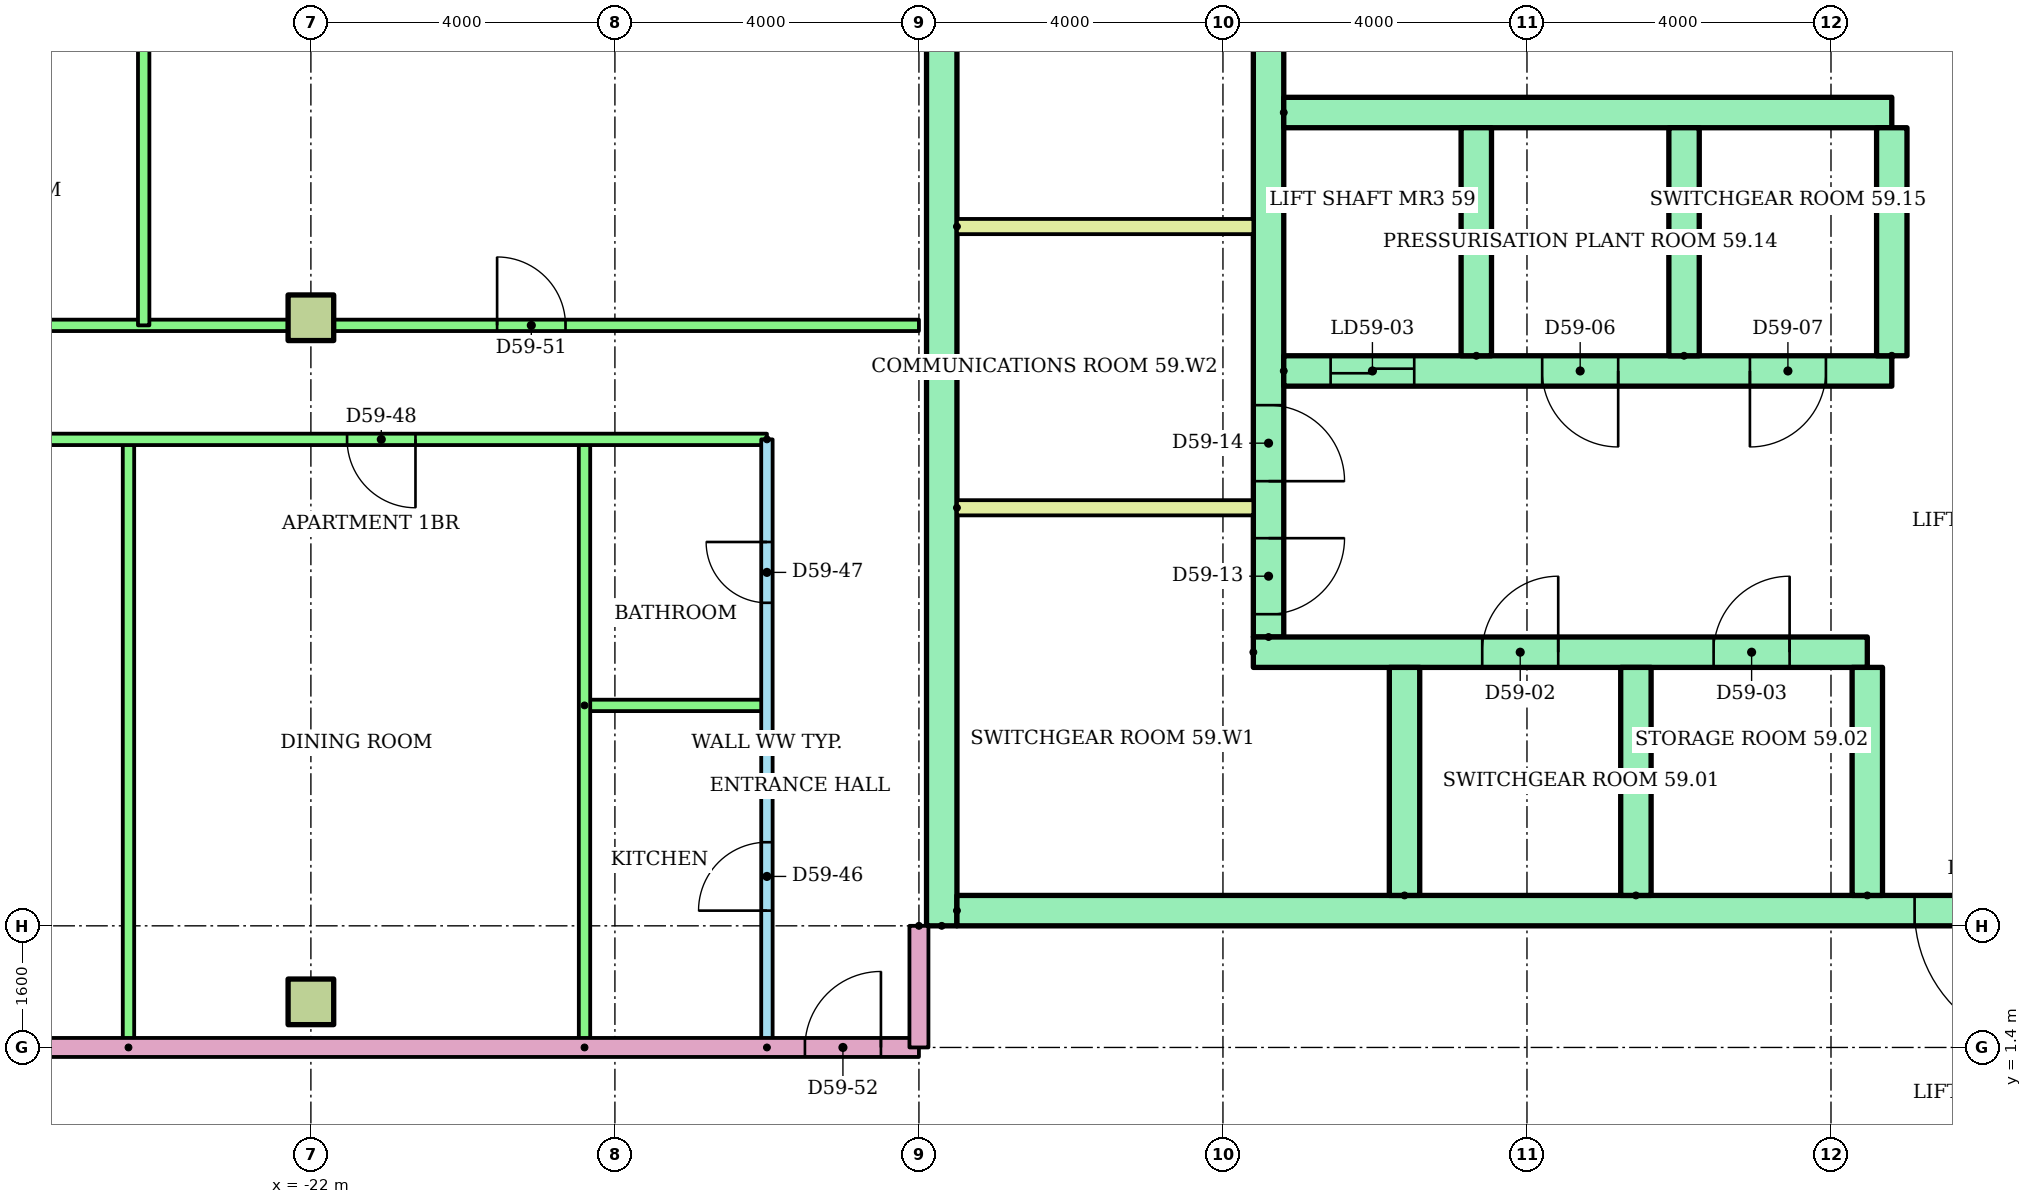
"""IFC4 building model, lengths in metres.
Left out: names, types, materials, properties, quantities, classifications, styles, units other than length and angle.
Written with IfcOpenShell. Run it as: python <this file> out.ifc"""

import sys

from ifc_helpers import new_model, si_unit, direction, frame, frame_2d, origin, origin_2d, place, context, subcontext, project, spatial, rectangle, extrude, element, fill, save


model = new_model("IFC4")
c1 = context("Model", 3, precision=1e-05, world=origin(), true_north=direction((0.0, 1.0)))
c2 = subcontext(c1, "Body", "Model", "MODEL_VIEW")
j1 = project(units=[si_unit("LENGTHUNIT", "METRE"), si_unit("PLANEANGLEUNIT", "RADIAN")], contexts=[c1])
p1 = place(None, origin())
s1 = spatial("IfcSite", under=j1, at=p1, CompositionType="ELEMENT")
p2 = place(p1, origin())
s2 = spatial("IfcBuilding", under=s1, at=p2, CompositionType="ELEMENT")
p3 = place(p2, frame((0.0, 0.0, 226.8)))
s3 = spatial("IfcBuildingStorey", under=s2, at=p3, CompositionType="ELEMENT", Elevation=226.8)
for number, where in (
    (1, (-22.0, 2.0, 0.0)),
    (2, (-22.0, 11.0, 0.0)),
):
    element("IfcColumn", number, at=place(p3, frame(where)), inside=s3, PredefinedType="COLUMN", context=c2, shape_type="SweptSolid", body=[
        extrude(rectangle(XDim=0.6, YDim=0.6, at=origin_2d()), origin(), (0.0, 0.0, 1.0), 3.2),
    ])
p4 = place(p3, frame((-13.7, 3.0, 0.0), z_axis=(0.0, 0.0, 1.0), x_axis=(0.0, 1.0, 0.0)))
e3 = element("IfcWall", 3, at=p4, inside=s3, PredefinedType="SHEAR", context=c2, shape_type="SweptSolid", body=[
    extrude(rectangle(XDim=17.0, YDim=0.4, at=frame_2d((8.5, 0.0))), origin(), (0.0, 0.0, 1.0), 2.92),
])
p5 = place(p3, frame((-9.4, 6.8, 0.0), z_axis=(0.0, 0.0, 1.0), x_axis=(0.0, 1.0, 0.0)))
e4 = element("IfcWall", 4, at=p5, inside=s3, PredefinedType="SHEAR", context=c2, shape_type="SweptSolid", body=[
    extrude(rectangle(XDim=12.7, YDim=0.4, at=frame_2d((6.35, 0.0))), origin(), (0.0, 0.0, 1.0), 2.92),
])
p6 = place(p5, frame((0.3, 0.0, 0.0)))
e5 = element("IfcOpeningElement", 5, at=p6, cuts=e4, PredefinedType="OPENING", context=c2, shape_type="SweptSolid", body=[
    extrude(rectangle(XDim=1.0, YDim=2.1, at=frame_2d((0.5, 1.05))), frame((0.0, 0.21, 0.0), z_axis=(0.0, -1.0, 0.0), x_axis=(1.0, 0.0, 0.0)), (0.0, 0.0, 1.0), 0.42),
])
p7 = place(p5, frame((2.05, 0.0, 0.0)))
e6 = element("IfcOpeningElement", 6, at=p7, cuts=e4, PredefinedType="OPENING", context=c2, shape_type="SweptSolid", body=[
    extrude(rectangle(XDim=1.0, YDim=2.1, at=frame_2d((0.5, 1.05))), frame((0.0, 0.21, 0.0), z_axis=(0.0, -1.0, 0.0), x_axis=(1.0, 0.0, 0.0)), (0.0, 0.0, 1.0), 0.42),
])
p8 = place(p5, frame((7.925, 0.0, 0.0)))
e7 = element("IfcOpeningElement", 7, at=p8, cuts=e4, PredefinedType="OPENING", context=c2, shape_type="SweptSolid", body=[
    extrude(rectangle(XDim=1.0, YDim=2.1, at=frame_2d((0.5, 1.05))), frame((0.0, 0.21, 0.0), z_axis=(0.0, -1.0, 0.0), x_axis=(1.0, 0.0, 0.0)), (0.0, 0.0, 1.0), 0.42),
])
p9 = place(p3, frame((-13.5, 3.2, 0.0)))
e8 = element("IfcWall", 8, at=p9, inside=s3, PredefinedType="SHEAR", context=c2, shape_type="SweptSolid", body=[
    extrude(rectangle(XDim=27.0, YDim=0.4, at=frame_2d((13.5, 0.0))), origin(), (0.0, 0.0, 1.0), 2.92),
])
p10 = place(p9, frame((22.083, 0.0, 0.0)))
e9 = element("IfcOpeningElement", 9, at=p10, cuts=e8, PredefinedType="OPENING", context=c2, shape_type="SweptSolid", body=[
    extrude(rectangle(XDim=1.1, YDim=2.1, at=frame_2d((0.55, 1.05))), frame((0.0, 0.21, 0.0), z_axis=(0.0, -1.0, 0.0), x_axis=(1.0, 0.0, 0.0)), (0.0, 0.0, 1.0), 0.42),
])
p11 = place(p9, frame((25.128, 0.0, 0.0)))
e10 = element("IfcOpeningElement", 10, at=p11, cuts=e8, PredefinedType="OPENING", context=c2, shape_type="SweptSolid", body=[
    extrude(rectangle(XDim=1.1, YDim=2.1, at=frame_2d((0.55, 1.05))), frame((0.0, 0.21, 0.0), z_axis=(0.0, -1.0, 0.0), x_axis=(1.0, 0.0, 0.0)), (0.0, 0.0, 1.0), 0.42),
])
p12 = place(p9, frame((12.6, 0.0, 0.0)))
e11 = element("IfcOpeningElement", 11, at=p12, cuts=e8, PredefinedType="OPENING", context=c2, shape_type="SweptSolid", body=[
    extrude(rectangle(XDim=1.8, YDim=2.1, at=frame_2d((0.9, 1.05))), frame((0.0, 0.21, 0.0), z_axis=(0.0, -1.0, 0.0), x_axis=(1.0, 0.0, 0.0)), (0.0, 0.0, 1.0), 0.42),
])
p13 = place(p3, frame((-9.6, 6.6, 0.0)))
e12 = element("IfcWall", 12, at=p13, inside=s3, PredefinedType="SHEAR", context=c2, shape_type="SweptSolid", body=[
    extrude(rectangle(XDim=8.078, YDim=0.4, at=frame_2d((4.039, 0.0))), origin(), (0.0, 0.0, 1.0), 2.92),
])
p14 = place(p13, frame((3.011, 0.0, 0.0)))
e13 = element("IfcOpeningElement", 13, at=p14, cuts=e12, PredefinedType="OPENING", context=c2, shape_type="SweptSolid", body=[
    extrude(rectangle(XDim=1.0, YDim=2.1, at=frame_2d((0.5, 1.05))), frame((0.0, 0.21, 0.0), z_axis=(0.0, -1.0, 0.0), x_axis=(1.0, 0.0, 0.0)), (0.0, 0.0, 1.0), 0.42),
])
p15 = place(p13, frame((6.056, 0.0, 0.0)))
e14 = element("IfcOpeningElement", 14, at=p15, cuts=e12, PredefinedType="OPENING", context=c2, shape_type="SweptSolid", body=[
    extrude(rectangle(XDim=1.0, YDim=2.1, at=frame_2d((0.5, 1.05))), frame((0.0, 0.21, 0.0), z_axis=(0.0, -1.0, 0.0), x_axis=(1.0, 0.0, 0.0)), (0.0, 0.0, 1.0), 0.42),
])
for number, where, z_axis, x_axis in (
    (15, (-7.611, 3.4, 0.0), (0.0, 0.0, 1.0), (0.0, 1.0, 0.0)),
    (16, (-4.567, 3.4, 0.0), (0.0, 0.0, 1.0), (0.0, 1.0, 0.0)),
    (17, (-1.522, 3.4, 0.0), (0.0, 0.0, 1.0), (0.0, 1.0, 0.0)),
):
    element("IfcWall", number, at=place(p3, frame(where, z_axis=z_axis, x_axis=x_axis)), inside=s3, PredefinedType="SHEAR", context=c2, shape_type="SweptSolid", body=[
        extrude(rectangle(XDim=3.0, YDim=0.4, at=frame_2d((1.5, 0.0))), origin(), (0.0, 0.0, 1.0), 2.92),
    ])
p16 = place(p3, frame((-9.2, 10.3, 0.0)))
e18 = element("IfcWall", 18, at=p16, inside=s3, PredefinedType="SHEAR", context=c2, shape_type="SweptSolid", body=[
    extrude(rectangle(XDim=8.0, YDim=0.4, at=frame_2d((4.0, 0.0))), origin(), (0.0, 0.0, 1.0), 2.92),
])
p17 = place(p16, frame((0.617, 0.0, 0.0)))
e19 = element("IfcOpeningElement", 19, at=p17, cuts=e18, PredefinedType="OPENING", context=c2, shape_type="SweptSolid", body=[
    extrude(rectangle(XDim=1.1, YDim=2.1, at=frame_2d((0.55, 1.05))), frame((0.0, 0.21, 0.0), z_axis=(0.0, -1.0, 0.0), x_axis=(1.0, 0.0, 0.0)), (0.0, 0.0, 1.0), 0.42),
])
p18 = place(p16, frame((3.4, 0.0, 0.0)))
e20 = element("IfcOpeningElement", 20, at=p18, cuts=e18, PredefinedType="OPENING", context=c2, shape_type="SweptSolid", body=[
    extrude(rectangle(XDim=1.0, YDim=2.1, at=frame_2d((0.5, 1.05))), frame((0.0, 0.21, 0.0), z_axis=(0.0, -1.0, 0.0), x_axis=(1.0, 0.0, 0.0)), (0.0, 0.0, 1.0), 0.42),
])
p19 = place(p16, frame((6.133, 0.0, 0.0)))
e21 = element("IfcOpeningElement", 21, at=p19, cuts=e18, PredefinedType="OPENING", context=c2, shape_type="SweptSolid", body=[
    extrude(rectangle(XDim=1.0, YDim=2.1, at=frame_2d((0.5, 1.05))), frame((0.0, 0.21, 0.0), z_axis=(0.0, -1.0, 0.0), x_axis=(1.0, 0.0, 0.0)), (0.0, 0.0, 1.0), 0.42),
])
p20 = place(p3, frame((-9.2, 13.7, 0.0)))
e22 = element("IfcWall", 22, at=p20, inside=s3, PredefinedType="SHEAR", context=c2, shape_type="SweptSolid", body=[
    extrude(rectangle(XDim=8.0, YDim=0.4, at=frame_2d((4.0, 0.0))), origin(), (0.0, 0.0, 1.0), 2.92),
])
for number, where, z_axis, x_axis in (
    (23, (-6.667, 10.5, 0.0), (0.0, 0.0, 1.0), (0.0, 1.0, 0.0)),
    (24, (-3.933, 10.5, 0.0), (0.0, 0.0, 1.0), (0.0, 1.0, 0.0)),
    (25, (-1.2, 10.5, 0.0), (0.0, 0.0, 1.0), (0.0, 1.0, 0.0)),
):
    element("IfcWall", number, at=place(p3, frame(where, z_axis=z_axis, x_axis=x_axis)), inside=s3, PredefinedType="SHEAR", context=c2, shape_type="SweptSolid", body=[
        extrude(rectangle(XDim=3.0, YDim=0.4, at=frame_2d((1.5, 0.0))), origin(), (0.0, 0.0, 1.0), 2.92),
    ])
for number, where in (
    (26, (-13.5, 8.5, 0.0)),
    (27, (-13.5, 12.2, 0.0)),
):
    element("IfcWall", number, at=place(p3, frame(where)), inside=s3, PredefinedType="PARTITIONING", context=c2, shape_type="SweptSolid", body=[
        extrude(rectangle(XDim=3.9, YDim=0.2, at=frame_2d((1.95, 0.0))), origin(), (0.0, 0.0, 1.0), 2.92),
    ])
p21 = place(p3, frame((-16.0, 1.4, 0.0), z_axis=(0.0, 0.0, 1.0), x_axis=(0.0, 1.0, 0.0)))
e28 = element("IfcWall", 28, at=p21, inside=s3, PredefinedType="PARTITIONING", context=c2, shape_type="SweptSolid", body=[
    extrude(rectangle(XDim=8.0, YDim=0.15, at=frame_2d((4.0, 0.0))), origin(), (0.0, 0.0, 1.0), 2.4),
])
p22 = place(p21, frame((1.8, 0.0, 0.0)))
e29 = element("IfcOpeningElement", 29, at=p22, cuts=e28, PredefinedType="OPENING", context=c2, shape_type="SweptSolid", body=[
    extrude(rectangle(XDim=0.9, YDim=2.1, at=frame_2d((0.45, 1.05))), frame((0.0, 0.085, 0.0), z_axis=(0.0, -1.0, 0.0), x_axis=(1.0, 0.0, 0.0)), (0.0, 0.0, 1.0), 0.17),
])
p23 = place(p21, frame((5.85, 0.0, 0.0)))
e30 = element("IfcOpeningElement", 30, at=p23, cuts=e28, PredefinedType="OPENING", context=c2, shape_type="SweptSolid", body=[
    extrude(rectangle(XDim=0.8, YDim=2.1, at=frame_2d((0.4, 1.05))), frame((0.0, 0.085, 0.0), z_axis=(0.0, -1.0, 0.0), x_axis=(1.0, 0.0, 0.0)), (0.0, 0.0, 1.0), 0.17),
])
p24 = place(p3, frame((-18.4, 5.9, 0.0)))
e31 = element("IfcWall", 31, at=p24, inside=s3, PredefinedType="PARTITIONING", context=c2, shape_type="SweptSolid", body=[
    extrude(rectangle(XDim=2.4, YDim=0.15, at=frame_2d((1.2, 0.0))), origin(), (0.0, 0.0, 1.0), 2.4),
])
for number, where, z_axis, x_axis in (
    (32, (-18.4, 1.4, 0.0), (0.0, 0.0, 1.0), (0.0, 1.0, 0.0)),
    (33, (-24.4, 1.4, 0.0), (0.0, 0.0, 1.0), (0.0, 1.0, 0.0)),
):
    element("IfcWall", number, at=place(p3, frame(where, z_axis=z_axis, x_axis=x_axis)), inside=s3, PredefinedType="PARTITIONING", context=c2, shape_type="SweptSolid", body=[
        extrude(rectangle(XDim=8.0, YDim=0.15, at=frame_2d((4.0, 0.0))), origin(), (0.0, 0.0, 1.0), 2.4),
    ])
p25 = place(p3, frame((-16.0, 9.4, 0.0), z_axis=(0.0, 0.0, 1.0), x_axis=(-1.0, 0.0, 0.0)))
e34 = element("IfcWall", 34, at=p25, inside=s3, PredefinedType="PARTITIONING", context=c2, shape_type="SweptSolid", body=[
    extrude(rectangle(XDim=12.92, YDim=0.15, at=frame_2d((6.46, 0.0))), origin(), (0.0, 0.0, 1.0), 2.4),
])
p26 = place(p25, frame((4.624, 0.0, 0.0)))
e35 = element("IfcOpeningElement", 35, at=p26, cuts=e34, PredefinedType="OPENING", context=c2, shape_type="SweptSolid", body=[
    extrude(rectangle(XDim=0.9, YDim=2.1, at=frame_2d((0.45, 1.05))), frame((0.0, 0.085, 0.0), z_axis=(0.0, -1.0, 0.0), x_axis=(1.0, 0.0, 0.0)), (0.0, 0.0, 1.0), 0.17),
])
p27 = place(p25, frame((10.1, 0.0, 0.0)))
e36 = element("IfcOpeningElement", 36, at=p27, cuts=e34, PredefinedType="OPENING", context=c2, shape_type="SweptSolid", body=[
    extrude(rectangle(XDim=0.9, YDim=2.1, at=frame_2d((0.45, 1.05))), frame((0.0, 0.085, 0.0), z_axis=(0.0, -1.0, 0.0), x_axis=(1.0, 0.0, 0.0)), (0.0, 0.0, 1.0), 0.17),
])
p28 = place(p3, frame((-28.92, 10.9, 0.0)))
e37 = element("IfcWall", 37, at=p28, inside=s3, PredefinedType="PARTITIONING", context=c2, shape_type="SweptSolid", body=[
    extrude(rectangle(XDim=14.92, YDim=0.15, at=frame_2d((7.46, 0.0))), origin(), (0.0, 0.0, 1.0), 2.4),
])
p29 = place(p28, frame((1.97, 0.0, 0.0)))
e38 = element("IfcOpeningElement", 38, at=p29, cuts=e37, PredefinedType="OPENING", context=c2, shape_type="SweptSolid", body=[
    extrude(rectangle(XDim=1.0, YDim=2.1, at=frame_2d((0.5, 1.05))), frame((0.0, 0.085, 0.0), z_axis=(0.0, -1.0, 0.0), x_axis=(1.0, 0.0, 0.0)), (0.0, 0.0, 1.0), 0.17),
])
p30 = place(p28, frame((9.37, 0.0, 0.0)))
e39 = element("IfcOpeningElement", 39, at=p30, cuts=e37, PredefinedType="OPENING", context=c2, shape_type="SweptSolid", body=[
    extrude(rectangle(XDim=0.9, YDim=2.1, at=frame_2d((0.45, 1.05))), frame((0.0, 0.085, 0.0), z_axis=(0.0, -1.0, 0.0), x_axis=(1.0, 0.0, 0.0)), (0.0, 0.0, 1.0), 0.17),
])
p31 = place(p3, frame((-24.2, 17.12, 0.0), z_axis=(0.0, 0.0, 1.0), x_axis=(0.0, -1.0, 0.0)))
e40 = element("IfcWall", 40, at=p31, inside=s3, PredefinedType="PARTITIONING", context=c2, shape_type="SweptSolid", body=[
    extrude(rectangle(XDim=6.22, YDim=0.15, at=frame_2d((3.11, 0.0))), origin(), (0.0, 0.0, 1.0), 2.4),
])
p32 = place(p3, frame((-28.92, 1.4, 0.0)))
e41 = element("IfcWall", 41, at=p32, inside=s3, PredefinedType="PARTITIONING", context=c2, shape_type="SweptSolid", body=[
    extrude(rectangle(XDim=14.92, YDim=0.25, at=frame_2d((7.46, 0.0))), origin(), (0.0, 0.0, 1.0), 2.4),
])
p33 = place(p32, frame((13.42, 0.0, 0.0)))
e42 = element("IfcOpeningElement", 42, at=p33, cuts=e41, PredefinedType="OPENING", context=c2, shape_type="SweptSolid", body=[
    extrude(rectangle(XDim=1.0, YDim=2.1, at=frame_2d((0.5, 1.05))), frame((0.0, 0.135, 0.0), z_axis=(0.0, -1.0, 0.0), x_axis=(1.0, 0.0, 0.0)), (0.0, 0.0, 1.0), 0.27),
])
p34 = place(p3, frame((-14.0, 3.0, 0.0), z_axis=(0.0, 0.0, 1.0), x_axis=(0.0, -1.0, 0.0)))
e43 = element("IfcWall", 43, at=p34, inside=s3, PredefinedType="PARTITIONING", context=c2, shape_type="SweptSolid", body=[
    extrude(rectangle(XDim=1.6, YDim=0.25, at=frame_2d((0.8, 0.0))), origin(), (0.0, 0.0, 1.0), 2.4),
])
p35 = place(p12, frame((1.8, 0.0, 0.0), z_axis=(0.0, 0.0, 1.0), x_axis=(-1.0, 0.0, 0.0)))
e44 = element("IfcDoor", 44, at=p35, inside=s3, OperationType="DOUBLE_DOOR_SINGLE_SWING", PredefinedType="DOOR", context=c2, shape_type="SweptSolid", body=[
    extrude(rectangle(XDim=1.8, YDim=2.1, at=frame_2d((0.9, 1.05))), frame((0.0, 0.025, 0.0), z_axis=(0.0, -1.0, 0.0), x_axis=(1.0, 0.0, 0.0)), (0.0, 0.0, 1.0), 0.05),
])
fill(e11, e44)
p36 = place(p14, origin())
e45 = element("IfcDoor", 45, at=p36, inside=s3, OperationType="SINGLE_SWING_RIGHT", PredefinedType="DOOR", context=c2, shape_type="SweptSolid", body=[
    extrude(rectangle(XDim=1.0, YDim=2.1, at=frame_2d((0.5, 1.05))), frame((0.0, 0.025, 0.0), z_axis=(0.0, -1.0, 0.0), x_axis=(1.0, 0.0, 0.0)), (0.0, 0.0, 1.0), 0.05),
])
fill(e13, e45)
p37 = place(p15, origin())
e46 = element("IfcDoor", 46, at=p37, inside=s3, OperationType="SINGLE_SWING_RIGHT", PredefinedType="DOOR", context=c2, shape_type="SweptSolid", body=[
    extrude(rectangle(XDim=1.0, YDim=2.1, at=frame_2d((0.5, 1.05))), frame((0.0, 0.025, 0.0), z_axis=(0.0, -1.0, 0.0), x_axis=(1.0, 0.0, 0.0)), (0.0, 0.0, 1.0), 0.05),
])
fill(e14, e46)
p38 = place(p17, origin())
e47 = element("IfcDoor", 47, at=p38, inside=s3, OperationType="SLIDING_TO_LEFT", PredefinedType="DOOR", context=c2, shape_type="SweptSolid", body=[
    extrude(rectangle(XDim=1.1, YDim=2.1, at=frame_2d((0.55, 1.05))), frame((0.0, 0.025, 0.0), z_axis=(0.0, -1.0, 0.0), x_axis=(1.0, 0.0, 0.0)), (0.0, 0.0, 1.0), 0.05),
])
fill(e19, e47)
p39 = place(p18, frame((1.0, 0.0, 0.0), z_axis=(0.0, 0.0, 1.0), x_axis=(-1.0, 0.0, 0.0)))
e48 = element("IfcDoor", 48, at=p39, inside=s3, OperationType="SINGLE_SWING_RIGHT", PredefinedType="DOOR", context=c2, shape_type="SweptSolid", body=[
    extrude(rectangle(XDim=1.0, YDim=2.1, at=frame_2d((0.5, 1.05))), frame((0.0, 0.025, 0.0), z_axis=(0.0, -1.0, 0.0), x_axis=(1.0, 0.0, 0.0)), (0.0, 0.0, 1.0), 0.05),
])
fill(e20, e48)
p40 = place(p19, frame((1.0, 0.0, 0.0), z_axis=(0.0, 0.0, 1.0), x_axis=(-1.0, 0.0, 0.0)))
e49 = element("IfcDoor", 49, at=p40, inside=s3, OperationType="SINGLE_SWING_LEFT", PredefinedType="DOOR", context=c2, shape_type="SweptSolid", body=[
    extrude(rectangle(XDim=1.0, YDim=2.1, at=frame_2d((0.5, 1.05))), frame((0.0, 0.025, 0.0), z_axis=(0.0, -1.0, 0.0), x_axis=(1.0, 0.0, 0.0)), (0.0, 0.0, 1.0), 0.05),
])
fill(e21, e49)
p41 = place(p6, frame((1.0, 0.0, 0.0), z_axis=(0.0, 0.0, 1.0), x_axis=(-1.0, 0.0, 0.0)))
e50 = element("IfcDoor", 50, at=p41, inside=s3, OperationType="SINGLE_SWING_RIGHT", PredefinedType="DOOR", context=c2, shape_type="SweptSolid", body=[
    extrude(rectangle(XDim=1.0, YDim=2.1, at=frame_2d((0.5, 1.05))), frame((0.0, 0.025, 0.0), z_axis=(0.0, -1.0, 0.0), x_axis=(1.0, 0.0, 0.0)), (0.0, 0.0, 1.0), 0.05),
])
fill(e5, e50)
p42 = place(p7, frame((1.0, 0.0, 0.0), z_axis=(0.0, 0.0, 1.0), x_axis=(-1.0, 0.0, 0.0)))
e51 = element("IfcDoor", 51, at=p42, inside=s3, OperationType="SINGLE_SWING_LEFT", PredefinedType="DOOR", context=c2, shape_type="SweptSolid", body=[
    extrude(rectangle(XDim=1.0, YDim=2.1, at=frame_2d((0.5, 1.05))), frame((0.0, 0.025, 0.0), z_axis=(0.0, -1.0, 0.0), x_axis=(1.0, 0.0, 0.0)), (0.0, 0.0, 1.0), 0.05),
])
fill(e6, e51)
p43 = place(p22, origin())
e52 = element("IfcDoor", 52, at=p43, inside=s3, OperationType="SINGLE_SWING_LEFT", PredefinedType="DOOR", context=c2, shape_type="SweptSolid", body=[
    extrude(rectangle(XDim=0.9, YDim=2.1, at=frame_2d((0.45, 1.05))), frame((0.0, 0.025, 0.0), z_axis=(0.0, -1.0, 0.0), x_axis=(1.0, 0.0, 0.0)), (0.0, 0.0, 1.0), 0.05),
])
fill(e29, e52)
p44 = place(p23, origin())
e53 = element("IfcDoor", 53, at=p44, inside=s3, OperationType="SINGLE_SWING_RIGHT", PredefinedType="DOOR", context=c2, shape_type="SweptSolid", body=[
    extrude(rectangle(XDim=0.8, YDim=2.1, at=frame_2d((0.4, 1.05))), frame((0.0, 0.025, 0.0), z_axis=(0.0, -1.0, 0.0), x_axis=(1.0, 0.0, 0.0)), (0.0, 0.0, 1.0), 0.05),
])
fill(e30, e53)
p45 = place(p26, origin())
e54 = element("IfcDoor", 54, at=p45, inside=s3, OperationType="SINGLE_SWING_LEFT", PredefinedType="DOOR", context=c2, shape_type="SweptSolid", body=[
    extrude(rectangle(XDim=0.9, YDim=2.1, at=frame_2d((0.45, 1.05))), frame((0.0, 0.025, 0.0), z_axis=(0.0, -1.0, 0.0), x_axis=(1.0, 0.0, 0.0)), (0.0, 0.0, 1.0), 0.05),
])
fill(e35, e54)
p46 = place(p30, origin())
e55 = element("IfcDoor", 55, at=p46, inside=s3, OperationType="SINGLE_SWING_LEFT", PredefinedType="DOOR", context=c2, shape_type="SweptSolid", body=[
    extrude(rectangle(XDim=0.9, YDim=2.1, at=frame_2d((0.45, 1.05))), frame((0.0, 0.025, 0.0), z_axis=(0.0, -1.0, 0.0), x_axis=(1.0, 0.0, 0.0)), (0.0, 0.0, 1.0), 0.05),
])
fill(e39, e55)
p47 = place(p33, origin())
e56 = element("IfcDoor", 56, at=p47, inside=s3, OperationType="SINGLE_SWING_RIGHT", PredefinedType="DOOR", context=c2, shape_type="SweptSolid", body=[
    extrude(rectangle(XDim=1.0, YDim=2.1, at=frame_2d((0.5, 1.05))), frame((0.0, 0.025, 0.0), z_axis=(0.0, -1.0, 0.0), x_axis=(1.0, 0.0, 0.0)), (0.0, 0.0, 1.0), 0.05),
])
fill(e42, e56)
save(model, sys.argv[1])
